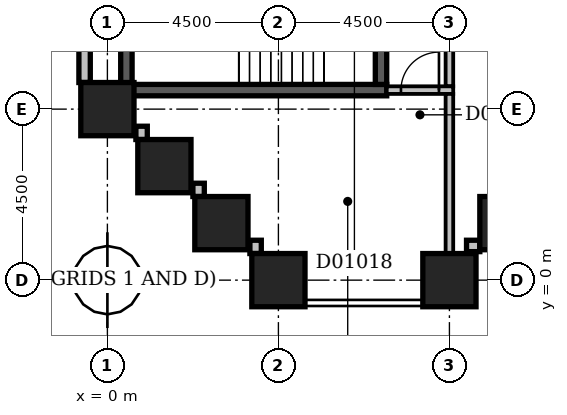
"""IFC4 building model, lengths in metres.
Left out: names, types, materials, properties, quantities, classifications, styles, units other than length and angle.
Written with IfcOpenShell. Run it as: python <this file> out.ifc"""

import sys

from ifc_helpers import new_model, si_unit, direction, frame, frame_2d, origin, origin_2d, place, context, subcontext, project, spatial, rectangle, extrude, element, fill, save


model = new_model("IFC4")
c1 = context("Model", 3, precision=1e-05, world=origin(), true_north=direction((0.0, 1.0)))
c2 = subcontext(c1, "Body", "Model", "MODEL_VIEW")
j1 = project(units=[si_unit("LENGTHUNIT", "METRE"), si_unit("PLANEANGLEUNIT", "RADIAN")], contexts=[c1])
p1 = place(None, origin())
s1 = spatial("IfcSite", under=j1, at=p1, CompositionType="ELEMENT")
p2 = place(p1, origin())
s2 = spatial("IfcBuilding", under=s1, at=p2, CompositionType="ELEMENT")
p3 = place(p2, frame((0.0, 0.0, 9.0)))
s3 = spatial("IfcBuildingStorey", under=s2, at=p3, CompositionType="ELEMENT", Elevation=9.0)
p4 = place(p3, frame((0.35, 5.0, -0.6), z_axis=(0.0, 0.0, 1.0), x_axis=(1.0, 0.0, 0.0)))
e1 = element("IfcWall", 1, at=p4, inside=s3, PredefinedType="SHEAR", context=c2, shape_type="SweptSolid", body=[
    extrude(rectangle(XDim=7.0, YDim=0.3, at=frame_2d((3.5, 0.0))), origin(), (0.0, 0.0, 1.0), 5.2),
])
p5 = place(p3, frame((0.5, 5.15, -0.6), z_axis=(0.0, 0.0, 1.0), x_axis=(0.0, 1.0, 0.0)))
e2 = element("IfcWall", 2, at=p5, inside=s3, PredefinedType="SHEAR", context=c2, shape_type="SweptSolid", body=[
    extrude(rectangle(XDim=4.2, YDim=0.3, at=frame_2d((2.1, 0.0))), origin(), (0.0, 0.0, 1.0), 5.2),
])
p6 = place(p3, frame((7.2, 5.15, -0.6), z_axis=(0.0, 0.0, 1.0), x_axis=(0.0, 1.0, 0.0)))
e3 = element("IfcWall", 3, at=p6, inside=s3, PredefinedType="SHEAR", context=c2, shape_type="SweptSolid", body=[
    extrude(rectangle(XDim=4.2, YDim=0.3, at=frame_2d((2.1, 0.0))), origin(), (0.0, 0.0, 1.0), 5.2),
])
p7 = place(p6, frame((1.55, 0.0, 0.6)))
e4 = element("IfcOpeningElement", 4, at=p7, cuts=e3, PredefinedType="OPENING", context=c2, shape_type="SweptSolid", body=[
    extrude(rectangle(XDim=1.1, YDim=2.1, at=frame_2d((0.55, 1.05))), frame((0.0, 0.162, 0.0), z_axis=(0.0, -1.0, 0.0), x_axis=(1.0, 0.0, 0.0)), (0.0, 0.0, 1.0), 0.324),
])
for number, where, z_axis, x_axis in (
    (5, (4.5, 0.0, -0.6), (0.0, 0.0, 1.0), (1.0, 0.0, 0.0)),
    (6, (9.0, 0.0, -0.6), (0.0, 0.0, 1.0), (1.0, 0.0, 0.0)),
    (7, (3.0, 1.5, -0.6), (0.0, 0.0, 1.0), (1.0, 0.0, 0.0)),
    (8, (10.5, 1.5, -0.6), (0.0, 0.0, 1.0), (1.0, 0.0, 0.0)),
    (9, (1.5, 3.0, -0.6), (0.0, 0.0, 1.0), (1.0, 0.0, 0.0)),
    (10, (0.0, 4.5, -0.6), (0.0, 0.0, 1.0), (1.0, 0.0, 0.0)),
):
    element("IfcColumn", number, at=place(p3, frame(where, z_axis=z_axis, x_axis=x_axis)), inside=s3, PredefinedType="COLUMN", context=c2, shape_type="SweptSolid", body=[
        extrude(rectangle(XDim=1.4, YDim=1.4, at=origin_2d()), origin(), (0.0, 0.0, 1.0), 5.2),
    ])
p8 = place(p3, frame((9.45, 0.9, 0.0), z_axis=(0.0, 0.0, 1.0), x_axis=(1.0, 0.0, 0.0)))
e11 = element("IfcWall", 11, at=p8, inside=s3, PredefinedType="STANDARD", context=c2, shape_type="SweptSolid", body=[
    extrude(rectangle(XDim=0.35, YDim=0.3, at=frame_2d((0.175, 0.0))), origin(), (0.0, 0.0, 1.0), 3.9),
])
p9 = place(p3, frame((-0.6, 8.3, 0.0), z_axis=(0.0, 0.0, 1.0), x_axis=(0.0, -1.0, 0.0)))
e12 = element("IfcWall", 12, at=p9, inside=s3, PredefinedType="STANDARD", context=c2, shape_type="SweptSolid", body=[
    extrude(rectangle(XDim=3.1, YDim=0.3, at=frame_2d((1.55, 0.0))), origin(), (0.0, 0.0, 1.0), 3.9),
])
for number, where, z_axis, x_axis in (
    (13, (0.9, 4.05, 0.0), (0.0, 0.0, 1.0), (0.0, -1.0, 0.0)),
    (14, (2.4, 2.55, 0.0), (0.0, 0.0, 1.0), (0.0, -1.0, 0.0)),
    (15, (3.9, 1.05, 0.0), (0.0, 0.0, 1.0), (0.0, -1.0, 0.0)),
):
    element("IfcWall", number, at=place(p3, frame(where, z_axis=z_axis, x_axis=x_axis)), inside=s3, PredefinedType="STANDARD", context=c2, shape_type="SweptSolid", body=[
        extrude(rectangle(XDim=0.35, YDim=0.3, at=frame_2d((0.175, 0.0))), origin(), (0.0, 0.0, 1.0), 3.9),
    ])
p10 = place(p3, frame((9.0, 0.0, 0.0), z_axis=(0.0, 0.0, 1.0), x_axis=(0.0, 1.0, 0.0)))
e16 = element("IfcWall", 16, at=p10, inside=s3, PredefinedType="PARTITIONING", context=c2, shape_type="SweptSolid", body=[
    extrude(rectangle(XDim=4.9, YDim=0.2, at=frame_2d((2.45, 0.0))), origin(), (0.0, 0.0, 1.0), 4.6),
])
p11 = place(p3, frame((7.35, 5.0, 0.0), z_axis=(0.0, 0.0, 1.0), x_axis=(1.0, 0.0, 0.0)))
e17 = element("IfcWall", 17, at=p11, inside=s3, PredefinedType="PARTITIONING", context=c2, shape_type="SweptSolid", body=[
    extrude(rectangle(XDim=1.75, YDim=0.2, at=frame_2d((0.875, 0.0))), origin(), (0.0, 0.0, 1.0), 4.6),
])
p12 = place(p11, frame((0.375, 0.0, 0.0)))
e18 = element("IfcOpeningElement", 18, at=p12, cuts=e17, PredefinedType="OPENING", context=c2, shape_type="SweptSolid", body=[
    extrude(rectangle(XDim=1.0, YDim=2.1, at=frame_2d((0.5, 1.05))), frame((0.0, 0.112, 0.0), z_axis=(0.0, -1.0, 0.0), x_axis=(1.0, 0.0, 0.0)), (0.0, 0.0, 1.0), 0.224),
])
p13 = place(p3, frame((9.0, 5.1, 0.0), z_axis=(0.0, 0.0, 1.0), x_axis=(0.0, 1.0, 0.0)))
e19 = element("IfcWall", 19, at=p13, inside=s3, PredefinedType="PARTITIONING", context=c2, shape_type="SweptSolid", body=[
    extrude(rectangle(XDim=3.9, YDim=0.2, at=frame_2d((1.95, 0.0))), origin(), (0.0, 0.0, 1.0), 4.6),
])
p14 = place(p13, frame((1.525, 0.0, 0.0)))
e20 = element("IfcOpeningElement", 20, at=p14, cuts=e19, PredefinedType="OPENING", context=c2, shape_type="SweptSolid", body=[
    extrude(rectangle(XDim=0.9, YDim=2.1, at=frame_2d((0.45, 1.05))), frame((0.0, 0.112, 0.0), z_axis=(0.0, -1.0, 0.0), x_axis=(1.0, 0.0, 0.0)), (0.0, 0.0, 1.0), 0.224),
])
p15 = place(p12, frame((1.0, 0.0, 0.0), z_axis=(0.0, 0.0, 1.0), x_axis=(-1.0, 0.0, 0.0)))
e21 = element("IfcDoor", 21, at=p15, inside=s3, OperationType="SINGLE_SWING_LEFT", PredefinedType="DOOR", context=c2, shape_type="SweptSolid", body=[
    extrude(rectangle(XDim=1.0, YDim=2.1, at=frame_2d((0.5, 1.05))), frame((0.0, 0.025, 0.0), z_axis=(0.0, -1.0, 0.0), x_axis=(1.0, 0.0, 0.0)), (0.0, 0.0, 1.0), 0.05),
])
fill(e18, e21)
save(model, sys.argv[1])
